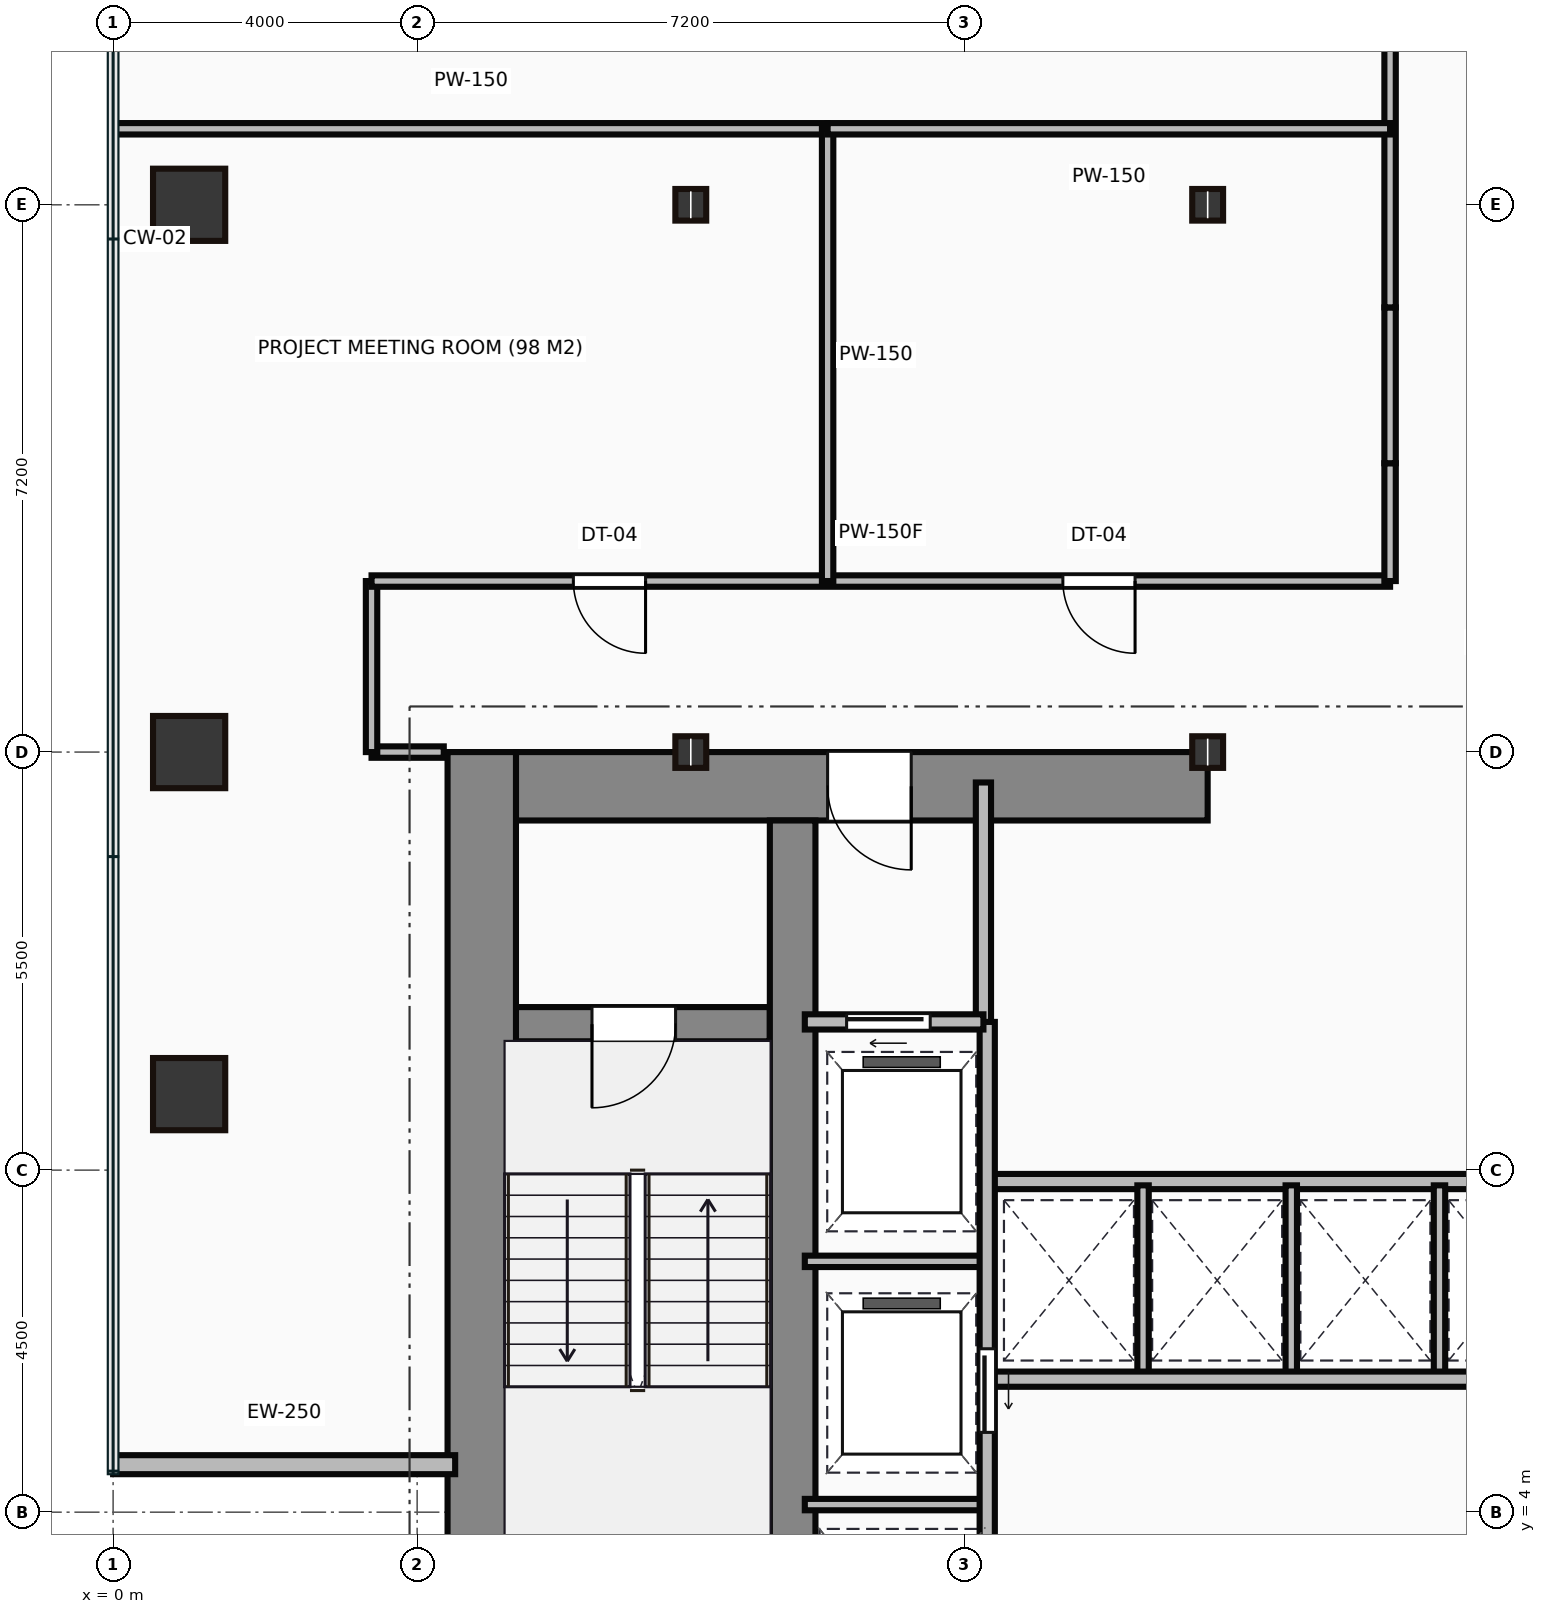
"""IFC4 building model, lengths in metres.
Left out: names, types, materials, properties, quantities, classifications, styles, units other than length and angle.
Written with IfcOpenShell. Run it as: python <this file> out.ifc"""

import sys

from ifc_helpers import new_model, si_unit, direction, frame, frame_2d, origin, origin_2d, place, context, subcontext, project, spatial, rectangle, hollow_rectangle, i_section, extrude, source, transform, mapped, element, fill, save


model = new_model("IFC4")
c1 = context("Model", 3, precision=1e-05, world=origin(), true_north=direction((0.0, 1.0)))
c2 = subcontext(c1, "Body", "Model", "MODEL_VIEW")
j1 = project(units=[si_unit("LENGTHUNIT", "METRE"), si_unit("PLANEANGLEUNIT", "RADIAN")], contexts=[c1])
p1 = place(None, origin())
s1 = spatial("IfcSite", under=j1, at=p1, CompositionType="ELEMENT")
p2 = place(p1, origin())
s2 = spatial("IfcBuilding", under=s1, at=p2, CompositionType="ELEMENT")
p3 = place(p2, frame((0.0, 0.0, 76.3)))
s3 = spatial("IfcBuildingStorey", under=s2, at=p3, CompositionType="ELEMENT", Elevation=76.3)
m1 = source(origin(), c2, "Body", "SweptSolid", [
    extrude(rectangle(XDim=13.1, YDim=0.9, at=frame_2d((6.55, 0.0))), origin(), (0.0, 0.0, 1.0), 3.65),
])
p4 = place(p3, frame((4.85, 0.9, 0.0), z_axis=(0.0, 0.0, 1.0), x_axis=(0.0, 1.0, 0.0)))
e1 = element("IfcWall", 1, at=p4, inside=s3, PredefinedType="SHEAR", context=c2, shape_type="MappedRepresentation", body=[
    mapped(m1, transform((0.0, 0.0, 0.0))),
])
m2 = source(origin(), c2, "Body", "SweptSolid", [
    extrude(rectangle(XDim=9.1, YDim=0.9, at=frame_2d((4.55, 0.0))), origin(), (0.0, 0.0, 1.0), 3.65),
])
p5 = place(p3, frame((5.3, 13.55, 0.0), z_axis=(0.0, 0.0, 1.0), x_axis=(1.0, 0.0, 0.0)))
e2 = element("IfcWall", 2, at=p5, inside=s3, PredefinedType="SHEAR", context=c2, shape_type="MappedRepresentation", body=[
    mapped(m2, transform((0.0, 0.0, 0.0))),
])
p6 = place(p5, frame((4.1, 0.0, 0.0)))
e3 = element("IfcOpeningElement", 3, at=p6, cuts=e2, PredefinedType="OPENING", context=c2, shape_type="SweptSolid", body=[
    extrude(rectangle(XDim=1.1, YDim=2.15, at=frame_2d((0.55, 1.075))), frame((0.0, 0.46, 0.0), z_axis=(0.0, -1.0, 0.0), x_axis=(1.0, 0.0, 0.0)), (0.0, 0.0, 1.0), 0.92),
])
m3 = source(origin(), c2, "Body", "SweptSolid", [
    extrude(rectangle(XDim=12.2, YDim=0.6, at=frame_2d((6.1, 0.0))), origin(), (0.0, 0.0, 1.0), 3.65),
])
p7 = place(p3, frame((8.94, 0.9, 0.0), z_axis=(0.0, 0.0, 1.0), x_axis=(0.0, 1.0, 0.0)))
e4 = element("IfcWall", 4, at=p7, inside=s3, PredefinedType="SHEAR", context=c2, shape_type="MappedRepresentation", body=[
    mapped(m3, transform((0.0, 0.0, 0.0))),
])
m4 = source(origin(), c2, "Body", "SweptSolid", [
    extrude(rectangle(XDim=3.39, YDim=0.45, at=frame_2d((1.695, 0.0))), origin(), (0.0, 0.0, 1.0), 3.65),
])
p8 = place(p3, frame((5.25, 10.42, 0.0), z_axis=(0.0, 0.0, 1.0), x_axis=(1.0, 0.0, 0.0)))
e5 = element("IfcWall", 5, at=p8, inside=s3, PredefinedType="SHEAR", context=c2, shape_type="MappedRepresentation", body=[
    mapped(m4, transform((0.0, 0.0, 0.0))),
])
p9 = place(p8, frame((1.05, 0.0, 0.0)))
e6 = element("IfcOpeningElement", 6, at=p9, cuts=e5, PredefinedType="OPENING", context=c2, shape_type="SweptSolid", body=[
    extrude(rectangle(XDim=1.1, YDim=2.15, at=frame_2d((0.55, 1.075))), frame((0.0, 0.235, 0.0), z_axis=(0.0, -1.0, 0.0), x_axis=(1.0, 0.0, 0.0)), (0.0, 0.0, 1.0), 0.47),
])
m5 = source(origin(), c2, "Body", "SweptSolid", [
    extrude(hollow_rectangle(XDim=0.95, YDim=0.95, WallThickness=0.045, at=origin_2d()), origin(), (0.0, 0.0, 1.0), 3.65),
])
for number, where, z_axis, x_axis in (
    (7, (1.0, 9.5, 0.0), (0.0, 0.0, 1.0), (1.0, 0.0, 0.0)),
    (8, (1.0, 14.0, 0.0), (0.0, 0.0, 1.0), (1.0, 0.0, 0.0)),
    (9, (1.0, 21.2, 0.0), (0.0, 0.0, 1.0), (1.0, 0.0, 0.0)),
):
    element("IfcColumn", number, at=place(p3, frame(where, z_axis=z_axis, x_axis=x_axis)), inside=s3, PredefinedType="COLUMN", context=c2, shape_type="MappedRepresentation", body=[
        mapped(m5, transform((0.0, 0.0, 0.0))),
    ])
m6 = source(origin(), c2, "Body", "SweptSolid", [
    extrude(i_section(OverallWidth=0.406, OverallDepth=0.416, WebThickness=0.03, FlangeThickness=0.048, at=origin_2d()), origin(), (0.0, 0.0, 1.0), 3.65),
])
for number, where, z_axis, x_axis in (
    (10, (7.6, 14.0, 0.0), (0.0, 0.0, 1.0), (1.0, 0.0, 0.0)),
    (11, (7.6, 21.2, 0.0), (0.0, 0.0, 1.0), (1.0, 0.0, 0.0)),
    (12, (14.4, 14.0, 0.0), (0.0, 0.0, 1.0), (1.0, 0.0, 0.0)),
    (13, (14.4, 21.2, 0.0), (0.0, 0.0, 1.0), (1.0, 0.0, 0.0)),
):
    element("IfcColumn", number, at=place(p3, frame(where, z_axis=z_axis, x_axis=x_axis)), inside=s3, PredefinedType="COLUMN", context=c2, shape_type="MappedRepresentation", body=[
        mapped(m6, transform((0.0, 0.0, 0.0))),
    ])
m7 = source(origin(), c2, "Body", "SweptSolid", [
    extrude(rectangle(XDim=4.5, YDim=0.25, at=frame_2d((2.25, 0.0))), origin(), (0.0, 0.0, 1.0), 3.4),
])
p10 = place(p3, frame((0.0, 4.625, 0.0), z_axis=(0.0, 0.0, 1.0), x_axis=(1.0, 0.0, 0.0)))
e14 = element("IfcWall", 14, at=p10, inside=s3, PredefinedType="STANDARD", context=c2, shape_type="MappedRepresentation", body=[
    mapped(m7, transform((0.0, 0.0, 0.0))),
])
m8 = source(origin(), c2, "Body", "SweptSolid", [
    extrude(rectangle(XDim=3.18, YDim=0.2, at=frame_2d((1.59, 0.0))), origin(), (0.0, 0.0, 1.0), 3.4),
])
p11 = place(p3, frame((11.45, 10.42, 0.0), z_axis=(0.0, 0.0, 1.0), x_axis=(0.0, 1.0, 0.0)))
e15 = element("IfcWall", 15, at=p11, inside=s3, PredefinedType="PARTITIONING", context=c2, shape_type="MappedRepresentation", body=[
    mapped(m8, transform((0.0, 0.0, 0.0))),
])
m9 = source(origin(), c2, "Body", "SweptSolid", [
    extrude(rectangle(XDim=2.35, YDim=0.2, at=frame_2d((1.175, 0.0))), origin(), (0.0, 0.0, 1.0), 3.4),
])
p12 = place(p3, frame((9.1, 10.45, 0.0), z_axis=(0.0, 0.0, 1.0), x_axis=(1.0, 0.0, 0.0)))
e16 = element("IfcWall", 16, at=p12, inside=s3, PredefinedType="PARTITIONING", context=c2, shape_type="MappedRepresentation", body=[
    mapped(m9, transform((0.0, 0.0, 0.0))),
])
p13 = place(p12, frame((0.55, 0.0, 0.0)))
e17 = element("IfcOpeningElement", 17, at=p13, cuts=e16, PredefinedType="OPENING", context=c2, shape_type="SweptSolid", body=[
    extrude(rectangle(XDim=1.1, YDim=2.15, at=frame_2d((0.55, 1.075))), frame((0.0, 0.11, 0.0), z_axis=(0.0, -1.0, 0.0), x_axis=(1.0, 0.0, 0.0)), (0.0, 0.0, 1.0), 0.22),
])
m10 = source(origin(), c2, "Body", "SweptSolid", [
    extrude(rectangle(XDim=9.6, YDim=0.2, at=frame_2d((4.8, 0.0))), origin(), (0.0, 0.0, 1.0), 3.4),
])
p14 = place(p3, frame((11.5, 0.85, 0.0), z_axis=(0.0, 0.0, 1.0), x_axis=(0.0, 1.0, 0.0)))
e18 = element("IfcWall", 18, at=p14, inside=s3, PredefinedType="PARTITIONING", context=c2, shape_type="MappedRepresentation", body=[
    mapped(m10, transform((0.0, 0.0, 0.0))),
])
p15 = place(p14, frame((4.2, 0.0, 0.0)))
e19 = element("IfcOpeningElement", 19, at=p15, cuts=e18, PredefinedType="OPENING", context=c2, shape_type="SweptSolid", body=[
    extrude(rectangle(XDim=1.1, YDim=2.15, at=frame_2d((0.55, 1.075))), frame((0.0, 0.11, 0.0), z_axis=(0.0, -1.0, 0.0), x_axis=(1.0, 0.0, 0.0)), (0.0, 0.0, 1.0), 0.22),
])
p16 = place(p14, frame((0.9, 0.0, 0.0)))
e20 = element("IfcOpeningElement", 20, at=p16, cuts=e18, PredefinedType="OPENING", context=c2, shape_type="SweptSolid", body=[
    extrude(rectangle(XDim=1.2, YDim=2.15, at=frame_2d((0.6, 1.075))), frame((0.0, 0.11, 0.0), z_axis=(0.0, -1.0, 0.0), x_axis=(1.0, 0.0, 0.0)), (0.0, 0.0, 1.0), 0.22),
])
m11 = source(origin(), c2, "Body", "SweptSolid", [
    extrude(rectangle(XDim=2.4, YDim=0.15, at=frame_2d((1.2, 0.0))), origin(), (0.0, 0.0, 1.0), 3.4),
])
for number, where, z_axis, x_axis in (
    (21, (9.1, 4.1, 0.0), (0.0, 0.0, 1.0), (1.0, 0.0, 0.0)),
    (22, (9.1, 7.3, 0.0), (0.0, 0.0, 1.0), (1.0, 0.0, 0.0)),
):
    element("IfcWall", number, at=place(p3, frame(where, z_axis=z_axis, x_axis=x_axis)), inside=s3, PredefinedType="PARTITIONING", context=c2, shape_type="MappedRepresentation", body=[
        mapped(m11, transform((0.0, 0.0, 0.0))),
    ])
m12 = source(origin(), c2, "Body", "SweptSolid", [
    extrude(rectangle(XDim=11.85, YDim=0.2, at=frame_2d((5.925, 0.0))), origin(), (0.0, 0.0, 1.0), 3.4),
])
for number, where, z_axis, x_axis in (
    (23, (11.55, 5.75, 0.0), (0.0, 0.0, 1.0), (1.0, 0.0, 0.0)),
    (24, (11.55, 8.35, 0.0), (0.0, 0.0, 1.0), (1.0, 0.0, 0.0)),
):
    element("IfcWall", number, at=place(p3, frame(where, z_axis=z_axis, x_axis=x_axis)), inside=s3, PredefinedType="PARTITIONING", context=c2, shape_type="MappedRepresentation", body=[
        mapped(m12, transform((0.0, 0.0, 0.0))),
    ])
m13 = source(origin(), c2, "Body", "SweptSolid", [
    extrude(rectangle(XDim=2.5, YDim=0.15, at=frame_2d((1.25, 0.0))), origin(), (0.0, 0.0, 1.0), 3.4),
])
for number, where, z_axis, x_axis in (
    (25, (13.55, 5.8, 0.0), (0.0, 0.0, 1.0), (0.0, 1.0, 0.0)),
    (26, (15.5, 5.8, 0.0), (0.0, 0.0, 1.0), (0.0, 1.0, 0.0)),
    (27, (17.45, 5.8, 0.0), (0.0, 0.0, 1.0), (0.0, 1.0, 0.0)),
):
    element("IfcWall", number, at=place(p3, frame(where, z_axis=z_axis, x_axis=x_axis)), inside=s3, PredefinedType="PARTITIONING", context=c2, shape_type="MappedRepresentation", body=[
        mapped(m13, transform((0.0, 0.0, 0.0))),
    ])
m14 = source(origin(), c2, "Body", "SweptSolid", [
    extrude(rectangle(XDim=0.95, YDim=0.15, at=frame_2d((0.475, 0.0))), origin(), (0.0, 0.0, 1.0), 2.625),
])
p17 = place(p3, frame((4.35, 14.0, 0.0), z_axis=(0.0, 0.0, 1.0), x_axis=(-1.0, 0.0, 0.0)))
e28 = element("IfcWall", 28, at=p17, inside=s3, PredefinedType="PARTITIONING", context=c2, shape_type="MappedRepresentation", body=[
    mapped(m14, transform((0.0, 0.0, 0.0))),
])
m15 = source(origin(), c2, "Body", "SweptSolid", [
    extrude(rectangle(XDim=2.25, YDim=0.15, at=frame_2d((1.125, 0.0))), origin(), (0.0, 0.0, 1.0), 3.4),
])
p18 = place(p3, frame((3.4, 14.0, 0.0), z_axis=(0.0, 0.0, 1.0), x_axis=(0.0, 1.0, 0.0)))
e29 = element("IfcWall", 29, at=p18, inside=s3, PredefinedType="PARTITIONING", context=c2, shape_type="MappedRepresentation", body=[
    mapped(m15, transform((0.0, 0.0, 0.0))),
])
m16 = source(origin(), c2, "Body", "SweptSolid", [
    extrude(rectangle(XDim=13.4, YDim=0.15, at=frame_2d((6.7, 0.0))), origin(), (0.0, 0.0, 1.0), 3.4),
])
p19 = place(p3, frame((3.4, 16.25, 0.0), z_axis=(0.0, 0.0, 1.0), x_axis=(1.0, 0.0, 0.0)))
e30 = element("IfcWall", 30, at=p19, inside=s3, PredefinedType="PARTITIONING", context=c2, shape_type="MappedRepresentation", body=[
    mapped(m16, transform((0.0, 0.0, 0.0))),
])
p20 = place(p19, frame((2.655, 0.0, 0.0)))
e31 = element("IfcOpeningElement", 31, at=p20, cuts=e30, PredefinedType="OPENING", context=c2, shape_type="SweptSolid", body=[
    extrude(rectangle(XDim=0.95, YDim=2.15, at=frame_2d((0.475, 1.075))), frame((0.0, 0.085, 0.0), z_axis=(0.0, -1.0, 0.0), x_axis=(1.0, 0.0, 0.0)), (0.0, 0.0, 1.0), 0.17),
])
p21 = place(p19, frame((9.095, 0.0, 0.0)))
e32 = element("IfcOpeningElement", 32, at=p21, cuts=e30, PredefinedType="OPENING", context=c2, shape_type="SweptSolid", body=[
    extrude(rectangle(XDim=0.95, YDim=2.15, at=frame_2d((0.475, 1.075))), frame((0.0, 0.085, 0.0), z_axis=(0.0, -1.0, 0.0), x_axis=(1.0, 0.0, 0.0)), (0.0, 0.0, 1.0), 0.17),
])
m17 = source(origin(), c2, "Body", "SweptSolid", [
    extrude(rectangle(XDim=1.55, YDim=0.15, at=frame_2d((0.775, 0.0))), origin(), (0.0, 0.0, 1.0), 3.4),
])
p22 = place(p3, frame((16.8, 16.25, 0.0), z_axis=(0.0, 0.0, 1.0), x_axis=(0.0, 1.0, 0.0)))
e33 = element("IfcWall", 33, at=p22, inside=s3, PredefinedType="PARTITIONING", context=c2, shape_type="MappedRepresentation", body=[
    mapped(m17, transform((0.0, 0.0, 0.0))),
])
m18 = source(origin(), c2, "Body", "SweptSolid", [
    extrude(rectangle(XDim=2.05, YDim=0.15, at=frame_2d((1.025, 0.0))), origin(), (0.0, 0.0, 1.0), 3.4),
])
p23 = place(p3, frame((16.8, 17.8, 0.0), z_axis=(0.0, 0.0, 1.0), x_axis=(0.0, 1.0, 0.0)))
e34 = element("IfcWall", 34, at=p23, inside=s3, PredefinedType="PARTITIONING", context=c2, shape_type="MappedRepresentation", body=[
    mapped(m18, transform((0.0, 0.0, 0.0))),
])
m19 = source(origin(), c2, "Body", "SweptSolid", [
    extrude(rectangle(XDim=16.15, YDim=0.15, at=frame_2d((8.075, 0.0))), origin(), (0.0, 0.0, 1.0), 3.4),
])
p24 = place(p3, frame((16.8, 19.85, 0.0), z_axis=(0.0, 0.0, 1.0), x_axis=(0.0, 1.0, 0.0)))
e35 = element("IfcWall", 35, at=p24, inside=s3, PredefinedType="PARTITIONING", context=c2, shape_type="MappedRepresentation", body=[
    mapped(m19, transform((0.0, 0.0, 0.0))),
])
p25 = place(p24, frame((7.075, 0.0, 0.0)))
e36 = element("IfcOpeningElement", 36, at=p25, cuts=e35, PredefinedType="OPENING", context=c2, shape_type="SweptSolid", body=[
    extrude(rectangle(XDim=0.95, YDim=2.15, at=frame_2d((0.475, 1.075))), frame((0.0, 0.085, 0.0), z_axis=(0.0, -1.0, 0.0), x_axis=(1.0, 0.0, 0.0)), (0.0, 0.0, 1.0), 0.17),
])
p26 = place(p24, frame((13.845, 0.0, 0.0)))
e37 = element("IfcOpeningElement", 37, at=p26, cuts=e35, PredefinedType="OPENING", context=c2, shape_type="SweptSolid", body=[
    extrude(rectangle(XDim=0.95, YDim=2.15, at=frame_2d((0.475, 1.075))), frame((0.0, 0.085, 0.0), z_axis=(0.0, -1.0, 0.0), x_axis=(1.0, 0.0, 0.0)), (0.0, 0.0, 1.0), 0.17),
])
m20 = source(origin(), c2, "Body", "SweptSolid", [
    extrude(rectangle(XDim=9.38, YDim=0.15, at=frame_2d((4.69, 0.0))), origin(), (0.0, 0.0, 1.0), 3.4),
])
p27 = place(p3, frame((0.02, 22.2, 0.0), z_axis=(0.0, 0.0, 1.0), x_axis=(1.0, 0.0, 0.0)))
e38 = element("IfcWall", 38, at=p27, inside=s3, PredefinedType="PARTITIONING", context=c2, shape_type="MappedRepresentation", body=[
    mapped(m20, transform((0.0, 0.0, 0.0))),
])
m21 = source(origin(), c2, "Body", "SweptSolid", [
    extrude(rectangle(XDim=5.95, YDim=0.15, at=frame_2d((2.975, 0.0))), origin(), (0.0, 0.0, 1.0), 3.4),
])
p28 = place(p3, frame((9.4, 22.2, 0.0), z_axis=(0.0, 0.0, 1.0), x_axis=(0.0, -1.0, 0.0)))
e39 = element("IfcWall", 39, at=p28, inside=s3, PredefinedType="PARTITIONING", context=c2, shape_type="MappedRepresentation", body=[
    mapped(m21, transform((0.0, 0.0, 0.0))),
])
m22 = source(origin(), c2, "Body", "SweptSolid", [
    extrude(rectangle(XDim=7.4, YDim=0.15, at=frame_2d((3.7, 0.0))), origin(), (0.0, 0.0, 1.0), 3.4),
])
p29 = place(p3, frame((16.8, 22.2, 0.0), z_axis=(0.0, 0.0, 1.0), x_axis=(-1.0, 0.0, 0.0)))
e40 = element("IfcWall", 40, at=p29, inside=s3, PredefinedType="PARTITIONING", context=c2, shape_type="MappedRepresentation", body=[
    mapped(m22, transform((0.0, 0.0, 0.0))),
])
m23 = source(origin(), c2, "Body", "SweptSolid", [
    extrude(rectangle(XDim=1.1, YDim=2.15, at=frame_2d((0.55, 1.075))), frame((0.0, 0.025, 0.0), z_axis=(0.0, -1.0, 0.0), x_axis=(1.0, 0.0, 0.0)), (0.0, 0.0, 1.0), 0.05),
])
p30 = place(p9, frame((1.1, 0.0, 0.0), z_axis=(0.0, 0.0, 1.0), x_axis=(-1.0, 0.0, 0.0)))
e41 = element("IfcDoor", 41, at=p30, inside=s3, OperationType="SINGLE_SWING_LEFT", PredefinedType="DOOR", context=c2, shape_type="MappedRepresentation", body=[
    mapped(m23, transform((0.0, 0.0, 0.0))),
])
fill(e6, e41)
p31 = place(p6, origin())
e42 = element("IfcDoor", 42, at=p31, inside=s3, OperationType="SINGLE_SWING_RIGHT", PredefinedType="DOOR", context=c2, shape_type="MappedRepresentation", body=[
    mapped(m23, transform((0.0, 0.0, 0.0))),
])
fill(e3, e42)
p32 = place(p13, origin())
e43 = element("IfcDoor", 43, at=p32, inside=s3, OperationType="SLIDING_TO_LEFT", PredefinedType="DOOR", context=c2, shape_type="MappedRepresentation", body=[
    mapped(m23, transform((0.0, 0.0, 0.0))),
])
fill(e17, e43)
p33 = place(p15, frame((1.1, 0.0, 0.0), z_axis=(0.0, 0.0, 1.0), x_axis=(-1.0, 0.0, 0.0)))
e44 = element("IfcDoor", 44, at=p33, inside=s3, OperationType="SLIDING_TO_LEFT", PredefinedType="DOOR", context=c2, shape_type="MappedRepresentation", body=[
    mapped(m23, transform((0.0, 0.0, 0.0))),
])
fill(e19, e44)
m24 = source(origin(), c2, "Body", "SweptSolid", [
    extrude(rectangle(XDim=0.95, YDim=2.15, at=frame_2d((0.475, 1.075))), frame((0.0, 0.025, 0.0), z_axis=(0.0, -1.0, 0.0), x_axis=(1.0, 0.0, 0.0)), (0.0, 0.0, 1.0), 0.05),
])
p34 = place(p20, origin())
e45 = element("IfcDoor", 45, at=p34, inside=s3, OperationType="SINGLE_SWING_RIGHT", PredefinedType="DOOR", context=c2, shape_type="MappedRepresentation", body=[
    mapped(m24, transform((0.0, 0.0, 0.0))),
])
fill(e31, e45)
p35 = place(p21, origin())
e46 = element("IfcDoor", 46, at=p35, inside=s3, OperationType="SINGLE_SWING_RIGHT", PredefinedType="DOOR", context=c2, shape_type="MappedRepresentation", body=[
    mapped(m24, transform((0.0, 0.0, 0.0))),
])
fill(e32, e46)
save(model, sys.argv[1])
